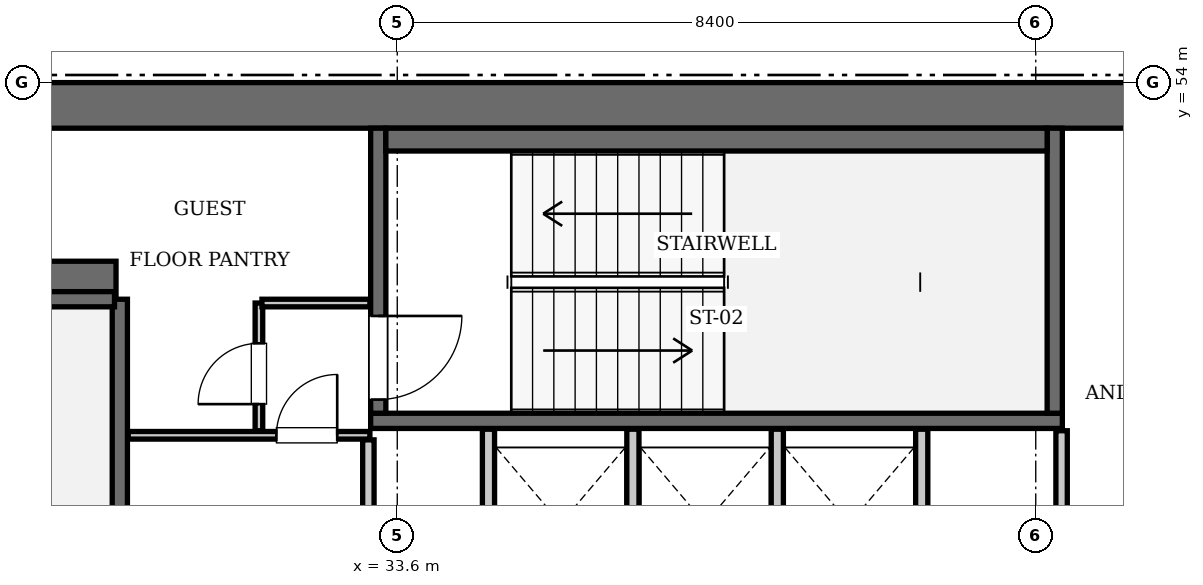
"""IFC4 building model, lengths in metres.
Left out: names, types, materials, properties, quantities, classifications, styles, units other than length and angle.
Written with IfcOpenShell. Run it as: python <this file> out.ifc"""

import sys

from ifc_helpers import new_model, si_unit, direction, frame, frame_2d, origin, place, context, subcontext, project, spatial, rectangle, extrude, element, fill, save


model = new_model("IFC4")
c1 = context("Model", 3, precision=1e-05, world=origin(), true_north=direction((0.0, 1.0)))
c2 = subcontext(c1, "Body", "Model", "MODEL_VIEW")
j1 = project(units=[si_unit("LENGTHUNIT", "METRE"), si_unit("PLANEANGLEUNIT", "RADIAN")], contexts=[c1])
p1 = place(None, origin())
s1 = spatial("IfcSite", under=j1, at=p1, CompositionType="ELEMENT")
p2 = place(p1, origin())
s2 = spatial("IfcBuilding", under=s1, at=p2, CompositionType="ELEMENT")
p3 = place(p2, frame((0.0, 0.0, 293.3)))
s3 = spatial("IfcBuildingStorey", under=s2, at=p3, CompositionType="ELEMENT", Elevation=293.3)
p4 = place(p3, frame((25.2, 53.7, 0.0), z_axis=(0.0, 0.0, 1.0), x_axis=(1.0, 0.0, 0.0)))
e1 = element("IfcWall", 1, at=p4, inside=s3, PredefinedType="SHEAR", context=c2, shape_type="SweptSolid", body=[
    extrude(rectangle(XDim=25.2, YDim=0.6, at=frame_2d((12.6, 0.0))), origin(), (0.0, 0.0, 1.0), 3.85),
])
p5 = place(p3, frame((25.8, 51.4, 0.0), z_axis=(0.0, 0.0, 1.0), x_axis=(1.0, 0.0, 0.0)))
e2 = element("IfcWall", 2, at=p5, inside=s3, PredefinedType="SHEAR", context=c2, shape_type="SweptSolid", body=[
    extrude(rectangle(XDim=4.1, YDim=0.5, at=frame_2d((2.05, 0.0))), origin(), (0.0, 0.0, 1.0), 3.85),
])
p6 = place(p3, frame((29.95, 42.0, 0.0), z_axis=(0.0, 0.0, 1.0), x_axis=(0.0, 1.0, 0.0)))
e3 = element("IfcWall", 3, at=p6, inside=s3, PredefinedType="SOLIDWALL", context=c2, shape_type="SweptSolid", body=[
    extrude(rectangle(XDim=9.15, YDim=0.2, at=frame_2d((4.575, 0.0))), origin(), (0.0, 0.0, 1.0), 3.61),
])
p7 = place(p3, frame((26.38, 51.15, 0.0), z_axis=(0.0, 0.0, 1.0), x_axis=(1.0, 0.0, 0.0)))
e4 = element("IfcWall", 4, at=p7, inside=s3, PredefinedType="SOLIDWALL", context=c2, shape_type="SweptSolid", body=[
    extrude(rectangle(XDim=3.5, YDim=0.2, at=frame_2d((1.75, 0.0))), origin(), (0.0, 0.0, 1.0), 3.61),
])
p8 = place(p3, frame((33.25, 49.55, 0.0), z_axis=(0.0, 0.0, 1.0), x_axis=(1.0, 0.0, 0.0)))
e5 = element("IfcWall", 5, at=p8, inside=s3, PredefinedType="SOLIDWALL", context=c2, shape_type="SweptSolid", body=[
    extrude(rectangle(XDim=9.1, YDim=0.2, at=frame_2d((4.55, 0.0))), origin(), (0.0, 0.0, 1.0), 3.61),
])
p9 = place(p3, frame((42.25, 49.65, 0.0), z_axis=(0.0, 0.0, 1.0), x_axis=(0.0, 1.0, 0.0)))
e6 = element("IfcWall", 6, at=p9, inside=s3, PredefinedType="SOLIDWALL", context=c2, shape_type="SweptSolid", body=[
    extrude(rectangle(XDim=3.75, YDim=0.2, at=frame_2d((1.875, 0.0))), origin(), (0.0, 0.0, 1.0), 3.61),
])
p10 = place(p3, frame((33.35, 49.65, 0.0), z_axis=(0.0, 0.0, 1.0), x_axis=(0.0, 1.0, 0.0)))
e7 = element("IfcWall", 7, at=p10, inside=s3, PredefinedType="SOLIDWALL", context=c2, shape_type="SweptSolid", body=[
    extrude(rectangle(XDim=3.75, YDim=0.2, at=frame_2d((1.875, 0.0))), origin(), (0.0, 0.0, 1.0), 3.61),
])
p11 = place(p10, frame((0.18, 0.0, 0.0)))
e8 = element("IfcOpeningElement", 8, at=p11, cuts=e7, PredefinedType="OPENING", context=c2, shape_type="SweptSolid", body=[
    extrude(rectangle(XDim=1.1, YDim=2.15, at=frame_2d((0.55, 1.075))), frame((0.0, 0.11, 0.0), z_axis=(0.0, -1.0, 0.0), x_axis=(1.0, 0.0, 0.0)), (0.0, 0.0, 1.0), 0.22),
])
p12 = place(p3, frame((33.45, 53.25, 0.0), z_axis=(0.0, 0.0, 1.0), x_axis=(1.0, 0.0, 0.0)))
e9 = element("IfcWall", 9, at=p12, inside=s3, PredefinedType="SOLIDWALL", context=c2, shape_type="SweptSolid", body=[
    extrude(rectangle(XDim=8.7, YDim=0.3, at=frame_2d((4.35, 0.0))), origin(), (0.0, 0.0, 1.0), 3.61),
])
for number, where, z_axis, x_axis in (
    (10, (34.8, 47.25, 0.0), (0.0, 0.0, 1.0), (0.0, 1.0, 0.0)),
    (11, (36.7, 47.25, 0.0), (0.0, 0.0, 1.0), (0.0, 1.0, 0.0)),
    (12, (38.6, 47.25, 0.0), (0.0, 0.0, 1.0), (0.0, 1.0, 0.0)),
    (13, (40.5, 47.25, 0.0), (0.0, 0.0, 1.0), (0.0, 1.0, 0.0)),
):
    element("IfcWall", number, at=place(p3, frame(where, z_axis=z_axis, x_axis=x_axis)), inside=s3, PredefinedType="SOLIDWALL", context=c2, shape_type="SweptSolid", body=[
        extrude(rectangle(XDim=2.19, YDim=0.16, at=frame_2d((1.095, 0.0))), origin(), (0.0, 0.0, 1.0), 3.61),
    ])
p13 = place(p3, frame((33.22, 45.14, 0.0), z_axis=(0.0, 0.0, 1.0), x_axis=(0.0, 1.0, 0.0)))
e14 = element("IfcWall", 14, at=p13, inside=s3, PredefinedType="PARTITIONING", context=c2, shape_type="SweptSolid", body=[
    extrude(rectangle(XDim=4.16, YDim=0.15, at=frame_2d((2.08, 0.0))), origin(), (0.0, 0.0, 1.0), 3.61),
])
p14 = place(p3, frame((30.06, 49.36, 0.0), z_axis=(0.0, 0.0, 1.0), x_axis=(1.0, 0.0, 0.0)))
e15 = element("IfcWall", 15, at=p14, inside=s3, PredefinedType="PARTITIONING", context=c2, shape_type="SweptSolid", body=[
    extrude(rectangle(XDim=3.18, YDim=0.1, at=frame_2d((1.59, 0.0))), origin(), (0.0, 0.0, 1.0), 3.61),
])
p15 = place(p14, frame((1.95, 0.0, 0.0)))
e16 = element("IfcOpeningElement", 16, at=p15, cuts=e15, PredefinedType="OPENING", context=c2, shape_type="SweptSolid", body=[
    extrude(rectangle(XDim=0.8, YDim=2.05, at=frame_2d((0.4, 1.025))), frame((0.0, 0.06, 0.0), z_axis=(0.0, -1.0, 0.0), x_axis=(1.0, 0.0, 0.0)), (0.0, 0.0, 1.0), 0.12),
])
p16 = place(p3, frame((31.78, 49.42, 0.0), z_axis=(0.0, 0.0, 1.0), x_axis=(0.0, 1.0, 0.0)))
e17 = element("IfcWall", 17, at=p16, inside=s3, PredefinedType="PARTITIONING", context=c2, shape_type="SweptSolid", body=[
    extrude(rectangle(XDim=1.68, YDim=0.1, at=frame_2d((0.84, 0.0))), origin(), (0.0, 0.0, 1.0), 3.61),
])
p17 = place(p16, frame((0.35, 0.0, 0.0)))
e18 = element("IfcOpeningElement", 18, at=p17, cuts=e17, PredefinedType="OPENING", context=c2, shape_type="SweptSolid", body=[
    extrude(rectangle(XDim=0.8, YDim=2.05, at=frame_2d((0.4, 1.025))), frame((0.0, 0.06, 0.0), z_axis=(0.0, -1.0, 0.0), x_axis=(1.0, 0.0, 0.0)), (0.0, 0.0, 1.0), 0.12),
])
p18 = place(p3, frame((31.82, 51.1, 0.0), z_axis=(0.0, 0.0, 1.0), x_axis=(1.0, 0.0, 0.0)))
e19 = element("IfcWall", 19, at=p18, inside=s3, PredefinedType="PARTITIONING", context=c2, shape_type="SweptSolid", body=[
    extrude(rectangle(XDim=1.42, YDim=0.1, at=frame_2d((0.71, 0.0))), origin(), (0.0, 0.0, 1.0), 3.61),
])
p19 = place(p3, frame((42.34, 47.36, 0.0), z_axis=(0.0, 0.0, 1.0), x_axis=(0.0, 1.0, 0.0)))
e20 = element("IfcWall", 20, at=p19, inside=s3, PredefinedType="PARTITIONING", context=c2, shape_type="SweptSolid", body=[
    extrude(rectangle(XDim=2.06, YDim=0.15, at=frame_2d((1.03, 0.0))), origin(), (0.0, 0.0, 1.0), 3.61),
])
p20 = place(p19, frame((0.24, 0.0, 0.0)))
e21 = element("IfcOpeningElement", 21, at=p20, cuts=e20, PredefinedType="OPENING", context=c2, shape_type="SweptSolid", body=[
    extrude(rectangle(XDim=0.8, YDim=2.05, at=frame_2d((0.4, 1.025))), frame((0.0, 0.085, 0.0), z_axis=(0.0, -1.0, 0.0), x_axis=(1.0, 0.0, 0.0)), (0.0, 0.0, 1.0), 0.17),
])
p21 = place(p11, frame((1.1, 0.0, 0.0), z_axis=(0.0, 0.0, 1.0), x_axis=(-1.0, 0.0, 0.0)))
e22 = element("IfcDoor", 22, at=p21, inside=s3, OperationType="SINGLE_SWING_LEFT", PredefinedType="DOOR", context=c2, shape_type="SweptSolid", body=[
    extrude(rectangle(XDim=1.1, YDim=2.15, at=frame_2d((0.55, 1.075))), frame((0.0, 0.025, 0.0), z_axis=(0.0, -1.0, 0.0), x_axis=(1.0, 0.0, 0.0)), (0.0, 0.0, 1.0), 0.05),
])
fill(e8, e22)
p22 = place(p15, origin())
e23 = element("IfcDoor", 23, at=p22, inside=s3, OperationType="SINGLE_SWING_RIGHT", PredefinedType="DOOR", context=c2, shape_type="SweptSolid", body=[
    extrude(rectangle(XDim=0.8, YDim=2.05, at=frame_2d((0.4, 1.025))), frame((0.0, 0.025, 0.0), z_axis=(0.0, -1.0, 0.0), x_axis=(1.0, 0.0, 0.0)), (0.0, 0.0, 1.0), 0.05),
])
fill(e16, e23)
p23 = place(p17, origin())
e24 = element("IfcDoor", 24, at=p23, inside=s3, OperationType="SINGLE_SWING_LEFT", PredefinedType="DOOR", context=c2, shape_type="SweptSolid", body=[
    extrude(rectangle(XDim=0.8, YDim=2.05, at=frame_2d((0.4, 1.025))), frame((0.0, 0.025, 0.0), z_axis=(0.0, -1.0, 0.0), x_axis=(1.0, 0.0, 0.0)), (0.0, 0.0, 1.0), 0.05),
])
fill(e18, e24)
save(model, sys.argv[1])
